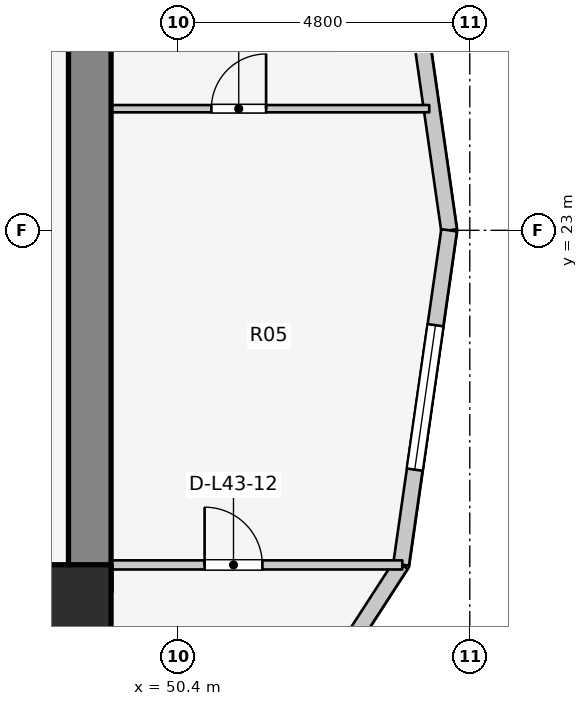
"""IFC4 building model, lengths in metres.
Left out: names, types, materials, properties, quantities, classifications, styles, units other than length and angle.
Written with IfcOpenShell. Run it as: python <this file> out.ifc"""

import sys

from ifc_helpers import new_model, si_unit, direction, frame, frame_2d, origin, origin_2d, place, context, subcontext, project, spatial, rectangle, extrude, element, fill, save


model = new_model("IFC4")
c1 = context("Model", 3, precision=1e-05, world=origin(), true_north=direction((0.0, 1.0)))
c2 = subcontext(c1, "Body", "Model", "MODEL_VIEW")
j1 = project(units=[si_unit("LENGTHUNIT", "METRE"), si_unit("PLANEANGLEUNIT", "RADIAN")], contexts=[c1])
p1 = place(None, origin())
s1 = spatial("IfcSite", under=j1, at=p1, CompositionType="ELEMENT")
p2 = place(p1, origin())
s2 = spatial("IfcBuilding", under=s1, at=p2, CompositionType="ELEMENT")
p3 = place(p2, frame((0.0, 0.0, 143.6)))
s3 = spatial("IfcBuildingStorey", under=s2, at=p3, CompositionType="ELEMENT", Elevation=143.6)
p4 = place(p3, frame((48.95, 17.05, 0.0), z_axis=(0.0, 0.0, 1.0), x_axis=(0.0, 1.0, 0.0)))
e1 = element("IfcWall", 1, at=p4, inside=s3, PredefinedType="SHEAR", context=c2, shape_type="SweptSolid", body=[
    extrude(rectangle(XDim=12.8, YDim=0.7, at=frame_2d((6.4, 0.0))), origin(), (0.0, 0.0, 1.0), 3.1),
])
p5 = place(p3, frame((48.7, 16.9, 0.0), z_axis=(0.0, 0.0, 1.0), x_axis=(1.0, 0.0, 0.0)))
e2 = element("IfcColumn", 2, at=p5, inside=s3, PredefinedType="COLUMN", context=c2, shape_type="SweptSolid", body=[
    extrude(rectangle(XDim=1.2, YDim=1.2, at=origin_2d()), origin(), (0.0, 0.0, 1.0), 3.1),
])
p6 = place(p3, frame((54.86, 23.0, 0.0), z_axis=(0.0, 0.0, 1.0), x_axis=(-0.142227632286, 0.989833976288, 0.0)))
e3 = element("IfcWall", 3, at=p6, inside=s3, PredefinedType="STANDARD", context=c2, shape_type="SweptSolid", body=[
    extrude(rectangle(XDim=5.553, YDim=0.26, at=frame_2d((2.776, 0.0))), origin(), (0.0, 0.0, 1.0), 2.85),
])
p7 = place(p6, frame((3.162, 0.0, 0.75)))
e4 = element("IfcOpeningElement", 4, at=p7, cuts=e3, PredefinedType="OPENING", context=c2, shape_type="SweptSolid", body=[
    extrude(rectangle(XDim=1.2, YDim=1.5, at=frame_2d((0.6, 0.75))), frame((0.0, 0.14, 0.0), z_axis=(0.0, -1.0, 0.0), x_axis=(1.0, 0.0, 0.0)), (0.0, 0.0, 1.0), 0.28),
])
p8 = place(p3, frame((51.619, 13.716, 0.0), z_axis=(0.0, 0.0, 1.0), x_axis=(0.543358984534, 0.839500454989, 0.0)))
e5 = element("IfcWall", 5, at=p8, inside=s3, PredefinedType="STANDARD", context=c2, shape_type="SweptSolid", body=[
    extrude(rectangle(XDim=4.511, YDim=0.26, at=frame_2d((2.256, 0.0))), origin(), (0.0, 0.0, 1.0), 2.85),
])
p9 = place(p8, frame((1.506, 0.0, 0.75)))
e6 = element("IfcOpeningElement", 6, at=p9, cuts=e5, PredefinedType="OPENING", context=c2, shape_type="SweptSolid", body=[
    extrude(rectangle(XDim=1.5, YDim=1.6, at=frame_2d((0.75, 0.8))), frame((0.0, 0.14, 0.0), z_axis=(0.0, -1.0, 0.0), x_axis=(1.0, 0.0, 0.0)), (0.0, 0.0, 1.0), 0.28),
])
p10 = place(p3, frame((54.07, 17.503, 0.0), z_axis=(0.0, 0.0, 1.0), x_axis=(0.142227632286, 0.989833976288, 0.0)))
e7 = element("IfcWall", 7, at=p10, inside=s3, PredefinedType="STANDARD", context=c2, shape_type="SweptSolid", body=[
    extrude(rectangle(XDim=5.553, YDim=0.26, at=frame_2d((2.776, 0.0))), origin(), (0.0, 0.0, 1.0), 2.85),
])
p11 = place(p10, frame((1.576, 0.0, 0.75)))
e8 = element("IfcOpeningElement", 8, at=p11, cuts=e7, PredefinedType="OPENING", context=c2, shape_type="SweptSolid", body=[
    extrude(rectangle(XDim=2.4, YDim=1.7, at=frame_2d((1.2, 0.85))), frame((0.0, 0.14, 0.0), z_axis=(0.0, -1.0, 0.0), x_axis=(1.0, 0.0, 0.0)), (0.0, 0.0, 1.0), 0.28),
])
p12 = place(p3, frame((48.95, 17.497, 0.0), z_axis=(0.0, 0.0, 1.0), x_axis=(1.0, 0.0, 0.0)))
e9 = element("IfcWall", 9, at=p12, inside=s3, PredefinedType="PARTITIONING", context=c2, shape_type="SweptSolid", body=[
    extrude(rectangle(XDim=5.14, YDim=0.15, at=frame_2d((2.57, 0.0))), origin(), (0.0, 0.0, 1.0), 2.855),
])
p13 = place(p12, frame((1.889, 0.0, 0.0)))
e10 = element("IfcOpeningElement", 10, at=p13, cuts=e9, PredefinedType="OPENING", context=c2, shape_type="SweptSolid", body=[
    extrude(rectangle(XDim=0.95, YDim=2.1, at=frame_2d((0.475, 1.05))), frame((0.0, 0.085, 0.0), z_axis=(0.0, -1.0, 0.0), x_axis=(1.0, 0.0, 0.0)), (0.0, 0.0, 1.0), 0.17),
])
p14 = place(p3, frame((48.95, 25.0, 0.0), z_axis=(0.0, 0.0, 1.0), x_axis=(1.0, 0.0, 0.0)))
e11 = element("IfcWall", 11, at=p14, inside=s3, PredefinedType="MOVABLE", context=c2, shape_type="SweptSolid", body=[
    extrude(rectangle(XDim=5.583, YDim=0.12, at=frame_2d((2.792, 0.0))), origin(), (0.0, 0.0, 1.0), 2.855),
])
p15 = place(p14, frame((2.0, 0.0, 0.0)))
e12 = element("IfcOpeningElement", 12, at=p15, cuts=e11, PredefinedType="OPENING", context=c2, shape_type="SweptSolid", body=[
    extrude(rectangle(XDim=0.9, YDim=2.1, at=frame_2d((0.45, 1.05))), frame((0.0, 0.07, 0.0), z_axis=(0.0, -1.0, 0.0), x_axis=(1.0, 0.0, 0.0)), (0.0, 0.0, 1.0), 0.14),
])
p16 = place(p11, origin())
e13 = element("IfcWindow", 13, at=p16, inside=s3, PartitioningType="SINGLE_PANEL", PredefinedType="WINDOW", context=c2, shape_type="SweptSolid", body=[
    extrude(rectangle(XDim=2.4, YDim=1.7, at=frame_2d((1.2, 0.85))), frame((0.0, 0.03, 0.0), z_axis=(0.0, -1.0, 0.0), x_axis=(1.0, 0.0, 0.0)), (0.0, 0.0, 1.0), 0.06),
])
fill(e8, e13)
p17 = place(p13, origin())
e14 = element("IfcDoor", 14, at=p17, inside=s3, OperationType="SINGLE_SWING_LEFT", PredefinedType="DOOR", context=c2, shape_type="SweptSolid", body=[
    extrude(rectangle(XDim=0.95, YDim=2.1, at=frame_2d((0.475, 1.05))), frame((0.0, 0.025, 0.0), z_axis=(0.0, -1.0, 0.0), x_axis=(1.0, 0.0, 0.0)), (0.0, 0.0, 1.0), 0.05),
])
fill(e10, e14)
p18 = place(p15, origin())
e15 = element("IfcDoor", 15, at=p18, inside=s3, OperationType="SINGLE_SWING_RIGHT", PredefinedType="DOOR", context=c2, shape_type="SweptSolid", body=[
    extrude(rectangle(XDim=0.9, YDim=2.1, at=frame_2d((0.45, 1.05))), frame((0.0, 0.025, 0.0), z_axis=(0.0, -1.0, 0.0), x_axis=(1.0, 0.0, 0.0)), (0.0, 0.0, 1.0), 0.05),
])
fill(e12, e15)
save(model, sys.argv[1])
